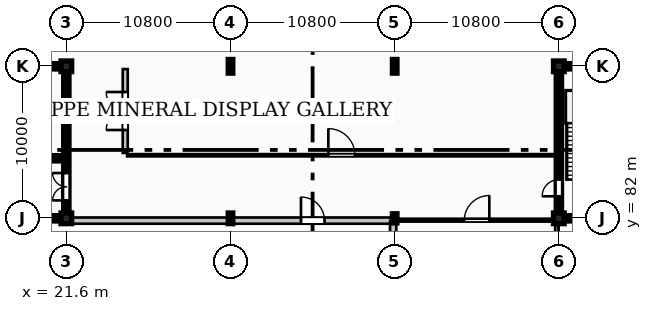
"""IFC4 building model, lengths in metres.
Left out: names, types, materials, properties, quantities, classifications, styles, units other than length and angle.
Written with IfcOpenShell. Run it as: python <this file> out.ifc"""

import sys

from ifc_helpers import new_model, si_unit, direction, frame, frame_2d, origin, origin_2d, place, context, subcontext, project, spatial, rectangle, i_section, extrude, element, fill, save


model = new_model("IFC4")
c1 = context("Model", 3, precision=1e-05, world=origin(), true_north=direction((0.0, 1.0)))
c2 = subcontext(c1, "Body", "Model", "MODEL_VIEW")
j1 = project(units=[si_unit("LENGTHUNIT", "METRE"), si_unit("PLANEANGLEUNIT", "RADIAN")], contexts=[c1])
p1 = place(None, origin())
s1 = spatial("IfcSite", under=j1, at=p1, CompositionType="ELEMENT")
p2 = place(p1, origin())
s2 = spatial("IfcBuilding", under=s1, at=p2, CompositionType="ELEMENT")
p3 = place(p2, origin())
s3 = spatial("IfcBuildingStorey", under=s2, at=p3, CompositionType="ELEMENT", Elevation=0.0)
for number, where, z_axis, x_axis in (
    (1, (21.6, 82.0, 0.0), (0.0, 0.0, 1.0), (1.0, 0.0, 0.0)),
    (2, (21.6, 92.0, 0.0), (0.0, 0.0, 1.0), (1.0, 0.0, 0.0)),
):
    element("IfcColumn", number, at=place(p3, frame(where, z_axis=z_axis, x_axis=x_axis)), inside=s3, PredefinedType="COLUMN", context=c2, shape_type="SweptSolid", body=[
        extrude(rectangle(XDim=0.7, YDim=0.7, at=origin_2d()), origin(), (0.0, 0.0, 1.0), 4.8),
    ])
p4 = place(p3, frame((32.4, 82.0, 0.0), z_axis=(0.0, 0.0, 1.0), x_axis=(1.0, 0.0, 0.0)))
e3 = element("IfcColumn", 3, at=p4, inside=s3, PredefinedType="COLUMN", context=c2, shape_type="SweptSolid", body=[
    extrude(i_section(OverallWidth=0.3, OverallDepth=0.7, WebThickness=0.017, FlangeThickness=0.032, FilletRadius=0.027, at=origin_2d()), origin(), (0.0, 0.0, 1.0), 4.8),
])
p5 = place(p3, frame((32.4, 92.0, 0.0), z_axis=(0.0, 0.0, 1.0), x_axis=(1.0, 0.0, 0.0)))
e4 = element("IfcColumn", 4, at=p5, inside=s3, PredefinedType="COLUMN", context=c2, shape_type="SweptSolid", body=[
    extrude(i_section(OverallWidth=0.3, OverallDepth=0.9, WebThickness=0.019, FlangeThickness=0.035, FilletRadius=0.03, at=origin_2d()), origin(), (0.0, 0.0, 1.0), 4.8),
])
p6 = place(p3, frame((43.2, 82.0, 0.0), z_axis=(0.0, 0.0, 1.0), x_axis=(1.0, 0.0, 0.0)))
e5 = element("IfcColumn", 5, at=p6, inside=s3, PredefinedType="COLUMN", context=c2, shape_type="SweptSolid", body=[
    extrude(i_section(OverallWidth=0.3, OverallDepth=0.6, WebThickness=0.015, FlangeThickness=0.03, FilletRadius=0.027, at=origin_2d()), origin(), (0.0, 0.0, 1.0), 4.8),
])
p7 = place(p3, frame((43.2, 92.0, 0.0), z_axis=(0.0, 0.0, 1.0), x_axis=(1.0, 0.0, 0.0)))
e6 = element("IfcColumn", 6, at=p7, inside=s3, PredefinedType="COLUMN", context=c2, shape_type="SweptSolid", body=[
    extrude(i_section(OverallWidth=0.3, OverallDepth=0.9, WebThickness=0.019, FlangeThickness=0.035, FilletRadius=0.03, at=origin_2d()), origin(), (0.0, 0.0, 1.0), 4.8),
])
for number, where, z_axis, x_axis in (
    (7, (54.0, 82.0, 0.0), (0.0, 0.0, 1.0), (1.0, 0.0, 0.0)),
    (8, (54.0, 92.0, 0.0), (0.0, 0.0, 1.0), (1.0, 0.0, 0.0)),
):
    element("IfcColumn", number, at=place(p3, frame(where, z_axis=z_axis, x_axis=x_axis)), inside=s3, PredefinedType="COLUMN", context=c2, shape_type="SweptSolid", body=[
        extrude(rectangle(XDim=0.7, YDim=0.7, at=origin_2d()), origin(), (0.0, 0.0, 1.0), 4.8),
    ])
p8 = place(p3, frame((11.15, 82.0, 0.0), z_axis=(0.0, 0.0, 1.0), x_axis=(1.0, 0.0, 0.0)))
e9 = element("IfcWall", 9, at=p8, inside=s3, PredefinedType="SHEAR", context=c2, shape_type="SweptSolid", body=[
    extrude(rectangle(XDim=10.1, YDim=0.35, at=frame_2d((5.05, 0.0))), origin(), (0.0, 0.0, 1.0), 4.56),
])
p9 = place(p3, frame((11.15, 92.0, 0.0), z_axis=(0.0, 0.0, 1.0), x_axis=(1.0, 0.0, 0.0)))
e10 = element("IfcWall", 10, at=p9, inside=s3, PredefinedType="SHEAR", context=c2, shape_type="SweptSolid", body=[
    extrude(rectangle(XDim=10.1, YDim=0.35, at=frame_2d((5.05, 0.0))), origin(), (0.0, 0.0, 1.0), 4.56),
])
p10 = place(p9, frame((1.3, 0.0, 0.0)))
e11 = element("IfcOpeningElement", 11, at=p10, cuts=e10, PredefinedType="OPENING", context=c2, shape_type="SweptSolid", body=[
    extrude(rectangle(XDim=1.6, YDim=2.2, at=frame_2d((0.8, 1.1))), frame((0.0, 0.185, 0.0), z_axis=(0.0, -1.0, 0.0), x_axis=(1.0, 0.0, 0.0)), (0.0, 0.0, 1.0), 0.37),
])
p11 = place(p3, frame((21.6, 82.35, 0.0), z_axis=(0.0, 0.0, 1.0), x_axis=(0.0, 1.0, 0.0)))
e12 = element("IfcWall", 12, at=p11, inside=s3, PredefinedType="SHEAR", context=c2, shape_type="SweptSolid", body=[
    extrude(rectangle(XDim=9.3, YDim=0.35, at=frame_2d((4.65, 0.0))), origin(), (0.0, 0.0, 1.0), 4.56),
])
p12 = place(p11, frame((0.83, 0.0, 0.0)))
e13 = element("IfcOpeningElement", 13, at=p12, cuts=e12, PredefinedType="OPENING", context=c2, shape_type="SweptSolid", body=[
    extrude(rectangle(XDim=1.8, YDim=2.25, at=frame_2d((0.9, 1.125))), frame((0.0, 0.185, 0.0), z_axis=(0.0, -1.0, 0.0), x_axis=(1.0, 0.0, 0.0)), (0.0, 0.0, 1.0), 0.37),
])
p13 = place(p3, frame((15.93, 85.95, 0.0), z_axis=(0.0, 0.0, 1.0), x_axis=(1.0, 0.0, 0.0)))
e14 = element("IfcWall", 14, at=p13, inside=s3, PredefinedType="SHEAR", context=c2, shape_type="SweptSolid", body=[
    extrude(rectangle(XDim=5.49, YDim=0.35, at=frame_2d((2.745, 0.0))), origin(), (0.0, 0.0, 1.0), 4.56),
])
p14 = place(p13, frame((0.65, 0.0, 0.0)))
e15 = element("IfcOpeningElement", 15, at=p14, cuts=e14, PredefinedType="OPENING", context=c2, shape_type="SweptSolid", body=[
    extrude(rectangle(XDim=1.1, YDim=2.2, at=frame_2d((0.55, 1.1))), frame((0.0, 0.185, 0.0), z_axis=(0.0, -1.0, 0.0), x_axis=(1.0, 0.0, 0.0)), (0.0, 0.0, 1.0), 0.37),
])
p15 = place(p13, frame((2.85, 0.0, 0.0)))
e16 = element("IfcOpeningElement", 16, at=p15, cuts=e14, PredefinedType="OPENING", context=c2, shape_type="SweptSolid", body=[
    extrude(rectangle(XDim=1.1, YDim=2.2, at=frame_2d((0.55, 1.1))), frame((0.0, 0.185, 0.0), z_axis=(0.0, -1.0, 0.0), x_axis=(1.0, 0.0, 0.0)), (0.0, 0.0, 1.0), 0.37),
])
p16 = place(p3, frame((54.35, 82.0, 0.0), z_axis=(0.0, 0.0, 1.0), x_axis=(1.0, 0.0, 0.0)))
e17 = element("IfcWall", 17, at=p16, inside=s3, PredefinedType="SHEAR", context=c2, shape_type="SweptSolid", body=[
    extrude(rectangle(XDim=10.1, YDim=0.35, at=frame_2d((5.05, 0.0))), origin(), (0.0, 0.0, 1.0), 4.56),
])
p17 = place(p3, frame((54.35, 92.0, 0.0), z_axis=(0.0, 0.0, 1.0), x_axis=(1.0, 0.0, 0.0)))
e18 = element("IfcWall", 18, at=p17, inside=s3, PredefinedType="SHEAR", context=c2, shape_type="SweptSolid", body=[
    extrude(rectangle(XDim=10.1, YDim=0.35, at=frame_2d((5.05, 0.0))), origin(), (0.0, 0.0, 1.0), 4.56),
])
p18 = place(p17, frame((1.3, 0.0, 0.0)))
e19 = element("IfcOpeningElement", 19, at=p18, cuts=e18, PredefinedType="OPENING", context=c2, shape_type="SweptSolid", body=[
    extrude(rectangle(XDim=1.6, YDim=2.2, at=frame_2d((0.8, 1.1))), frame((0.0, 0.185, 0.0), z_axis=(0.0, -1.0, 0.0), x_axis=(1.0, 0.0, 0.0)), (0.0, 0.0, 1.0), 0.37),
])
p19 = place(p3, frame((54.0, 82.35, 0.0), z_axis=(0.0, 0.0, 1.0), x_axis=(0.0, 1.0, 0.0)))
e20 = element("IfcWall", 20, at=p19, inside=s3, PredefinedType="SHEAR", context=c2, shape_type="SweptSolid", body=[
    extrude(rectangle(XDim=9.3, YDim=0.35, at=frame_2d((4.65, 0.0))), origin(), (0.0, 0.0, 1.0), 4.56),
])
p20 = place(p19, frame((1.1, 0.0, 0.0)))
e21 = element("IfcOpeningElement", 21, at=p20, cuts=e20, PredefinedType="OPENING", context=c2, shape_type="SweptSolid", body=[
    extrude(rectangle(XDim=1.1, YDim=2.2, at=frame_2d((0.55, 1.1))), frame((0.0, 0.185, 0.0), z_axis=(0.0, -1.0, 0.0), x_axis=(1.0, 0.0, 0.0)), (0.0, 0.0, 1.0), 0.37),
])
p21 = place(p3, frame((21.78, 81.85, 0.0), z_axis=(0.0, 0.0, 1.0), x_axis=(1.0, 0.0, 0.0)))
e22 = element("IfcWall", 22, at=p21, inside=s3, PredefinedType="PARTITIONING", context=c2, shape_type="SweptSolid", body=[
    extrude(rectangle(XDim=10.42, YDim=0.41, at=frame_2d((5.21, 0.0))), origin(), (0.0, 0.0, 1.0), 3.989),
])
p22 = place(p3, frame((32.6, 81.85, 0.0), z_axis=(0.0, 0.0, 1.0), x_axis=(1.0, 0.0, 0.0)))
e23 = element("IfcWall", 23, at=p22, inside=s3, PredefinedType="PARTITIONING", context=c2, shape_type="SweptSolid", body=[
    extrude(rectangle(XDim=10.42, YDim=0.41, at=frame_2d((5.21, 0.0))), origin(), (0.0, 0.0, 1.0), 3.989),
])
p23 = place(p22, frame((4.435, 0.0, 0.0)))
e24 = element("IfcOpeningElement", 24, at=p23, cuts=e23, PredefinedType="OPENING", context=c2, shape_type="SweptSolid", body=[
    extrude(rectangle(XDim=1.55, YDim=2.4, at=frame_2d((0.775, 1.2))), frame((0.0, 0.215, 0.0), z_axis=(0.0, -1.0, 0.0), x_axis=(1.0, 0.0, 0.0)), (0.0, 0.0, 1.0), 0.43),
])
p24 = place(p3, frame((43.38, 81.85, 0.0), z_axis=(0.0, 0.0, 1.0), x_axis=(1.0, 0.0, 0.0)))
e25 = element("IfcWall", 25, at=p24, inside=s3, PredefinedType="PARTITIONING", context=c2, shape_type="SweptSolid", body=[
    extrude(rectangle(XDim=10.44, YDim=0.13, at=frame_2d((5.22, 0.0))), origin(), (0.0, 0.0, 1.0), 3.989),
])
p25 = place(p24, frame((4.395, 0.0, 0.0)))
e26 = element("IfcOpeningElement", 26, at=p25, cuts=e25, PredefinedType="OPENING", context=c2, shape_type="SweptSolid", body=[
    extrude(rectangle(XDim=1.65, YDim=2.4, at=frame_2d((0.825, 1.2))), frame((0.0, 0.075, 0.0), z_axis=(0.0, -1.0, 0.0), x_axis=(1.0, 0.0, 0.0)), (0.0, 0.0, 1.0), 0.15),
])
p26 = place(p3, frame((25.6, 86.15, 0.0), z_axis=(0.0, 0.0, 1.0), x_axis=(1.0, 0.0, 0.0)))
e27 = element("IfcWall", 27, at=p26, inside=s3, PredefinedType="PARTITIONING", context=c2, shape_type="SweptSolid", body=[
    extrude(rectangle(XDim=28.22, YDim=0.15, at=frame_2d((14.11, 0.0))), origin(), (0.0, 0.0, 1.0), 4.52),
])
p27 = place(p26, frame((13.235, 0.0, 0.0)))
e28 = element("IfcOpeningElement", 28, at=p27, cuts=e27, PredefinedType="OPENING", context=c2, shape_type="SweptSolid", body=[
    extrude(rectangle(XDim=1.75, YDim=2.45, at=frame_2d((0.875, 1.225))), frame((0.0, 0.085, 0.0), z_axis=(0.0, -1.0, 0.0), x_axis=(1.0, 0.0, 0.0)), (0.0, 0.0, 1.0), 0.17),
])
p28 = place(p3, frame((25.475, 86.3, 0.0), z_axis=(0.0, 0.0, 1.0), x_axis=(0.0, 1.0, 0.0)))
e29 = element("IfcWall", 29, at=p28, inside=s3, PredefinedType="PARTITIONING", context=c2, shape_type="SweptSolid", body=[
    extrude(rectangle(XDim=5.52, YDim=0.33, at=frame_2d((2.76, 0.0))), origin(), (0.0, 0.0, 1.0), 4.52),
])
p29 = place(p28, frame((1.51, 0.0, 0.0)))
e30 = element("IfcOpeningElement", 30, at=p29, cuts=e29, PredefinedType="OPENING", context=c2, shape_type="SweptSolid", body=[
    extrude(rectangle(XDim=2.5, YDim=2.75, at=frame_2d((1.25, 1.375))), frame((0.0, 0.175, 0.0), z_axis=(0.0, -1.0, 0.0), x_axis=(1.0, 0.0, 0.0)), (0.0, 0.0, 1.0), 0.35),
])
p30 = place(p3, frame((43.1, 72.2, 0.0), z_axis=(0.0, 0.0, 1.0), x_axis=(0.0, 1.0, 0.0)))
e31 = element("IfcWall", 31, at=p30, inside=s3, PredefinedType="PARTITIONING", context=c2, shape_type="SweptSolid", body=[
    extrude(rectangle(XDim=9.62, YDim=0.41, at=frame_2d((4.81, 0.0))), origin(), (0.0, 0.0, 1.0), 4.52),
])
p31 = place(p3, frame((53.86, 72.2, 0.0), z_axis=(0.0, 0.0, 1.0), x_axis=(0.0, 1.0, 0.0)))
e32 = element("IfcWall", 32, at=p31, inside=s3, PredefinedType="PARTITIONING", context=c2, shape_type="SweptSolid", body=[
    extrude(rectangle(XDim=9.62, YDim=0.21, at=frame_2d((4.81, 0.0))), origin(), (0.0, 0.0, 1.0), 4.52),
])
p32 = place(p12, origin())
e33 = element("IfcDoor", 33, at=p32, inside=s3, OperationType="DOUBLE_DOOR_SINGLE_SWING", PredefinedType="DOOR", context=c2, shape_type="SweptSolid", body=[
    extrude(rectangle(XDim=1.8, YDim=2.25, at=frame_2d((0.9, 1.125))), frame((0.0, 0.025, 0.0), z_axis=(0.0, -1.0, 0.0), x_axis=(1.0, 0.0, 0.0)), (0.0, 0.0, 1.0), 0.05),
])
fill(e13, e33)
p33 = place(p23, origin())
e34 = element("IfcDoor", 34, at=p33, inside=s3, OperationType="SINGLE_SWING_LEFT", PredefinedType="DOOR", context=c2, shape_type="SweptSolid", body=[
    extrude(rectangle(XDim=1.55, YDim=2.4, at=frame_2d((0.775, 1.2))), frame((0.0, 0.025, 0.0), z_axis=(0.0, -1.0, 0.0), x_axis=(1.0, 0.0, 0.0)), (0.0, 0.0, 1.0), 0.05),
])
fill(e24, e34)
p34 = place(p25, origin())
e35 = element("IfcDoor", 35, at=p34, inside=s3, OperationType="SINGLE_SWING_RIGHT", PredefinedType="DOOR", context=c2, shape_type="SweptSolid", body=[
    extrude(rectangle(XDim=1.65, YDim=2.4, at=frame_2d((0.825, 1.2))), frame((0.0, 0.025, 0.0), z_axis=(0.0, -1.0, 0.0), x_axis=(1.0, 0.0, 0.0)), (0.0, 0.0, 1.0), 0.05),
])
fill(e26, e35)
p35 = place(p27, origin())
e36 = element("IfcDoor", 36, at=p35, inside=s3, OperationType="SINGLE_SWING_LEFT", PredefinedType="DOOR", context=c2, shape_type="SweptSolid", body=[
    extrude(rectangle(XDim=1.75, YDim=2.45, at=frame_2d((0.875, 1.225))), frame((0.0, 0.025, 0.0), z_axis=(0.0, -1.0, 0.0), x_axis=(1.0, 0.0, 0.0)), (0.0, 0.0, 1.0), 0.05),
])
fill(e28, e36)
p36 = place(p29, origin())
e37 = element("IfcDoor", 37, at=p36, inside=s3, OperationType="DOUBLE_DOOR_SINGLE_SWING", PredefinedType="DOOR", context=c2, shape_type="SweptSolid", body=[
    extrude(rectangle(XDim=2.5, YDim=2.75, at=frame_2d((1.25, 1.375))), frame((0.0, 0.025, 0.0), z_axis=(0.0, -1.0, 0.0), x_axis=(1.0, 0.0, 0.0)), (0.0, 0.0, 1.0), 0.05),
])
fill(e30, e37)
p37 = place(p20, origin())
e38 = element("IfcDoor", 38, at=p37, inside=s3, OperationType="SINGLE_SWING_LEFT", PredefinedType="DOOR", context=c2, shape_type="SweptSolid", body=[
    extrude(rectangle(XDim=1.1, YDim=2.2, at=frame_2d((0.55, 1.1))), frame((0.0, 0.025, 0.0), z_axis=(0.0, -1.0, 0.0), x_axis=(1.0, 0.0, 0.0)), (0.0, 0.0, 1.0), 0.05),
])
fill(e21, e38)
save(model, sys.argv[1])
